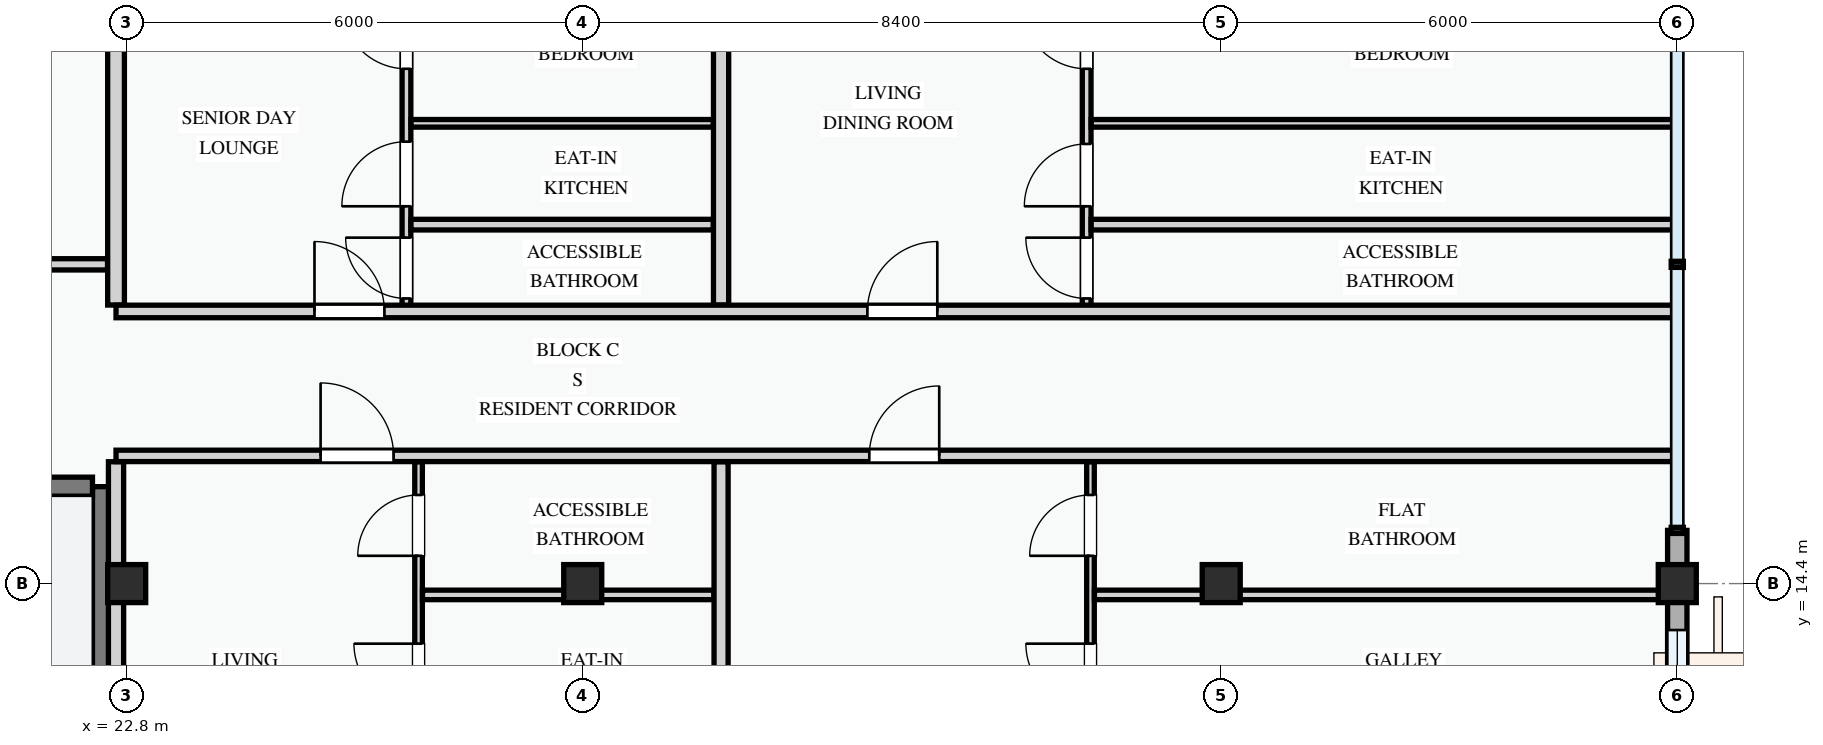
"""IFC4 building model, lengths in metres.
Left out: names, types, materials, properties, quantities, classifications, styles, units other than length and angle.
Written with IfcOpenShell. Run it as: python <this file> out.ifc"""

import sys

from ifc_helpers import new_model, si_unit, direction, frame, frame_2d, origin, origin_2d, place, context, subcontext, project, spatial, rectangle, extrude, element, fill, save


model = new_model("IFC4")
c1 = context("Model", 3, precision=1e-05, world=origin(), true_north=direction((0.0, 1.0)))
c2 = subcontext(c1, "Body", "Model", "MODEL_VIEW")
j1 = project(units=[si_unit("LENGTHUNIT", "METRE"), si_unit("PLANEANGLEUNIT", "RADIAN")], contexts=[c1])
p1 = place(None, origin())
s1 = spatial("IfcSite", under=j1, at=p1, CompositionType="ELEMENT")
p2 = place(p1, origin())
s2 = spatial("IfcBuilding", under=s1, at=p2, CompositionType="ELEMENT")
p3 = place(p2, frame((0.0, 0.0, 31.2)))
s3 = spatial("IfcBuildingStorey", under=s2, at=p3, CompositionType="ELEMENT", Elevation=31.2)
for number, where, z_axis, x_axis in (
    (1, (22.8, 14.4, 0.0), (0.0, 0.0, 1.0), (1.0, 0.0, 0.0)),
    (2, (28.8, 14.4, 0.0), (0.0, 0.0, 1.0), (1.0, 0.0, 0.0)),
    (3, (37.2, 14.4, 0.0), (0.0, 0.0, 1.0), (1.0, 0.0, 0.0)),
    (4, (43.2, 14.4, 0.0), (0.0, 0.0, 1.0), (1.0, 0.0, 0.0)),
):
    element("IfcColumn", number, at=place(p3, frame(where, z_axis=z_axis, x_axis=x_axis)), inside=s3, PredefinedType="COLUMN", context=c2, shape_type="SweptSolid", body=[
        extrude(rectangle(XDim=0.5, YDim=0.5, at=origin_2d()), origin(), (0.0, 0.0, 1.0), 3.3),
    ])
p4 = place(p3, frame((43.2, 8.4, 0.0), z_axis=(0.0, 0.0, 1.0), x_axis=(0.0, 1.0, 0.0)))
e5 = element("IfcWall", 5, at=p4, inside=s3, PredefinedType="STANDARD", context=c2, shape_type="SweptSolid", body=[
    extrude(rectangle(XDim=6.0, YDim=0.255, at=frame_2d((3.0, 0.0))), origin(), (0.0, 0.0, 1.0), 2.575),
])
p5 = place(p4, frame((1.504, 0.0, 0.78)))
e6 = element("IfcOpeningElement", 6, at=p5, cuts=e5, PredefinedType="OPENING", context=c2, shape_type="SweptSolid", body=[
    extrude(rectangle(XDim=0.9, YDim=1.2, at=frame_2d((0.45, 0.6))), frame((0.0, 0.137, 0.0), z_axis=(0.0, -1.0, 0.0), x_axis=(1.0, 0.0, 0.0)), (0.0, 0.0, 1.0), 0.275),
])
p6 = place(p4, frame((4.139, 0.0, 0.78)))
e7 = element("IfcOpeningElement", 7, at=p6, cuts=e5, PredefinedType="OPENING", context=c2, shape_type="SweptSolid", body=[
    extrude(rectangle(XDim=1.25, YDim=1.3, at=frame_2d((0.625, 0.65))), frame((0.0, 0.137, 0.0), z_axis=(0.0, -1.0, 0.0), x_axis=(1.0, 0.0, 0.0)), (0.0, 0.0, 1.0), 0.275),
])
p7 = place(p3, frame((43.2, 14.4, 0.0), z_axis=(0.0, 0.0, 1.0), x_axis=(0.0, 1.0, 0.0)))
e8 = element("IfcWall", 8, at=p7, inside=s3, PredefinedType="STANDARD", context=c2, shape_type="SweptSolid", body=[
    extrude(rectangle(XDim=0.7, YDim=0.255, at=frame_2d((0.35, 0.0))), origin(), (0.0, 0.0, 1.0), 2.425),
])
p8 = place(p3, frame((22.475, 8.75, 0.0), z_axis=(0.0, 0.0, 1.0), x_axis=(0.0, 1.0, 0.0)))
e9 = element("IfcWall", 9, at=p8, inside=s3, PredefinedType="SHEAR", context=c2, shape_type="SweptSolid", body=[
    extrude(rectangle(XDim=6.925, YDim=0.25, at=frame_2d((3.462, 0.0))), origin(), (0.0, 0.0, 1.0), 3.0),
])
p9 = place(p3, frame((8.85, 15.675, 0.0), z_axis=(0.0, 0.0, 1.0), x_axis=(1.0, 0.0, 0.0)))
e10 = element("IfcWall", 10, at=p9, inside=s3, PredefinedType="SHEAR", context=c2, shape_type="SweptSolid", body=[
    extrude(rectangle(XDim=13.5, YDim=0.25, at=frame_2d((6.75, 0.0))), origin(), (0.0, 0.0, 1.0), 3.0),
])
p10 = place(p9, frame((6.2, 0.0, 0.0)))
e11 = element("IfcOpeningElement", 11, at=p10, cuts=e10, PredefinedType="OPENING", context=c2, shape_type="SweptSolid", body=[
    extrude(rectangle(XDim=1.1, YDim=2.15, at=frame_2d((0.55, 1.075))), frame((0.0, 0.135, 0.0), z_axis=(0.0, -1.0, 0.0), x_axis=(1.0, 0.0, 0.0)), (0.0, 0.0, 1.0), 0.27),
])
p11 = place(p3, frame((18.025, 18.6, 0.0), z_axis=(0.0, 0.0, 1.0), x_axis=(1.0, 0.0, 0.0)))
e12 = element("IfcWall", 12, at=p11, inside=s3, PredefinedType="PARTITIONING", context=c2, shape_type="SweptSolid", body=[
    extrude(rectangle(XDim=4.523, YDim=0.148, at=frame_2d((2.262, 0.0))), origin(), (0.0, 0.0, 1.0), 3.0),
])
p12 = place(p11, frame((1.65, 0.0, 0.0)))
e13 = element("IfcOpeningElement", 13, at=p12, cuts=e12, PredefinedType="OPENING", context=c2, shape_type="SweptSolid", body=[
    extrude(rectangle(XDim=1.0, YDim=2.15, at=frame_2d((0.5, 1.075))), frame((0.0, 0.084, 0.0), z_axis=(0.0, -1.0, 0.0), x_axis=(1.0, 0.0, 0.0)), (0.0, 0.0, 1.0), 0.168),
])
p13 = place(p3, frame((26.64, 8.53, 0.0), z_axis=(0.0, 0.0, 1.0), x_axis=(0.0, 1.0, 0.0)))
e14 = element("IfcWall", 14, at=p13, inside=s3, PredefinedType="PARTITIONING", context=c2, shape_type="SweptSolid", body=[
    extrude(rectangle(XDim=7.473, YDim=0.1, at=frame_2d((3.737, 0.0))), origin(), (0.0, 0.0, 1.0), 3.0),
])
p14 = place(p13, frame((1.334, 0.0, 0.0)))
e15 = element("IfcOpeningElement", 15, at=p14, cuts=e14, PredefinedType="OPENING", context=c2, shape_type="SweptSolid", body=[
    extrude(rectangle(XDim=0.85, YDim=2.1, at=frame_2d((0.425, 1.05))), frame((0.0, 0.06, 0.0), z_axis=(0.0, -1.0, 0.0), x_axis=(1.0, 0.0, 0.0)), (0.0, 0.0, 1.0), 0.12),
])
p15 = place(p13, frame((4.23, 0.0, 0.0)))
e16 = element("IfcOpeningElement", 16, at=p15, cuts=e14, PredefinedType="OPENING", context=c2, shape_type="SweptSolid", body=[
    extrude(rectangle(XDim=0.85, YDim=2.1, at=frame_2d((0.425, 1.05))), frame((0.0, 0.06, 0.0), z_axis=(0.0, -1.0, 0.0), x_axis=(1.0, 0.0, 0.0)), (0.0, 0.0, 1.0), 0.12),
])
p16 = place(p13, frame((6.236, 0.0, 0.0)))
e17 = element("IfcOpeningElement", 17, at=p16, cuts=e14, PredefinedType="OPENING", context=c2, shape_type="SweptSolid", body=[
    extrude(rectangle(XDim=0.8, YDim=2.1, at=frame_2d((0.4, 1.05))), frame((0.0, 0.06, 0.0), z_axis=(0.0, -1.0, 0.0), x_axis=(1.0, 0.0, 0.0)), (0.0, 0.0, 1.0), 0.12),
])
p17 = place(p3, frame((26.692, 14.251, 0.0), z_axis=(0.0, 0.0, 1.0), x_axis=(1.0, 0.0, 0.0)))
e18 = element("IfcWall", 18, at=p17, inside=s3, PredefinedType="PARTITIONING", context=c2, shape_type="SweptSolid", body=[
    extrude(rectangle(XDim=3.833, YDim=0.125, at=frame_2d((1.917, 0.0))), origin(), (0.0, 0.0, 1.0), 2.375),
])
p18 = place(p3, frame((26.481, 17.98, 0.0), z_axis=(0.0, 0.0, 1.0), x_axis=(0.0, 1.0, 0.0)))
e19 = element("IfcWall", 19, at=p18, inside=s3, PredefinedType="PARTITIONING", context=c2, shape_type="SweptSolid", body=[
    extrude(rectangle(XDim=4.69, YDim=0.115, at=frame_2d((2.345, 0.0))), origin(), (0.0, 0.0, 1.0), 3.0),
])
p19 = place(p18, frame((0.171, 0.0, 0.0)))
e20 = element("IfcOpeningElement", 20, at=p19, cuts=e19, PredefinedType="OPENING", context=c2, shape_type="SweptSolid", body=[
    extrude(rectangle(XDim=0.8, YDim=2.1, at=frame_2d((0.4, 1.05))), frame((0.0, 0.067, 0.0), z_axis=(0.0, -1.0, 0.0), x_axis=(1.0, 0.0, 0.0)), (0.0, 0.0, 1.0), 0.135),
])
p20 = place(p18, frame((1.384, 0.0, 0.0)))
e21 = element("IfcOpeningElement", 21, at=p20, cuts=e19, PredefinedType="OPENING", context=c2, shape_type="SweptSolid", body=[
    extrude(rectangle(XDim=0.85, YDim=2.1, at=frame_2d((0.425, 1.05))), frame((0.0, 0.067, 0.0), z_axis=(0.0, -1.0, 0.0), x_axis=(1.0, 0.0, 0.0)), (0.0, 0.0, 1.0), 0.135),
])
p21 = place(p18, frame((3.193, 0.0, 0.0)))
e22 = element("IfcOpeningElement", 22, at=p21, cuts=e19, PredefinedType="OPENING", context=c2, shape_type="SweptSolid", body=[
    extrude(rectangle(XDim=0.85, YDim=2.1, at=frame_2d((0.425, 1.05))), frame((0.0, 0.067, 0.0), z_axis=(0.0, -1.0, 0.0), x_axis=(1.0, 0.0, 0.0)), (0.0, 0.0, 1.0), 0.135),
])
p22 = place(p3, frame((26.54, 20.455, 0.0), z_axis=(0.0, 0.0, 1.0), x_axis=(1.0, 0.0, 0.0)))
e23 = element("IfcWall", 23, at=p22, inside=s3, PredefinedType="PARTITIONING", context=c2, shape_type="SweptSolid", body=[
    extrude(rectangle(XDim=3.978, YDim=0.1, at=frame_2d((1.989, 0.0))), origin(), (0.0, 0.0, 1.0), 3.0),
])
p23 = place(p3, frame((26.54, 19.122, 0.0), z_axis=(0.0, 0.0, 1.0), x_axis=(1.0, 0.0, 0.0)))
e24 = element("IfcWall", 24, at=p23, inside=s3, PredefinedType="PARTITIONING", context=c2, shape_type="SweptSolid", body=[
    extrude(rectangle(XDim=3.978, YDim=0.14, at=frame_2d((1.989, 0.0))), origin(), (0.0, 0.0, 1.0), 3.0),
])
p24 = place(p3, frame((22.66, 8.53, 0.0), z_axis=(0.0, 0.0, 1.0), x_axis=(0.0, 1.0, 0.0)))
e25 = element("IfcWall", 25, at=p24, inside=s3, PredefinedType="PARTITIONING", context=c2, shape_type="SweptSolid", body=[
    extrude(rectangle(XDim=7.473, YDim=0.2, at=frame_2d((3.737, 0.0))), origin(), (0.0, 0.0, 1.0), 2.425),
])
p25 = place(p3, frame((22.66, 18.064, 0.0), z_axis=(0.0, 0.0, 1.0), x_axis=(0.0, 1.0, 0.0)))
e26 = element("IfcWall", 26, at=p25, inside=s3, PredefinedType="PARTITIONING", context=c2, shape_type="SweptSolid", body=[
    extrude(rectangle(XDim=4.676, YDim=0.22, at=frame_2d((2.338, 0.0))), origin(), (0.0, 0.0, 1.0), 2.425),
])
p26 = place(p3, frame((35.48, 8.53, 0.0), z_axis=(0.0, 0.0, 1.0), x_axis=(0.0, 1.0, 0.0)))
e27 = element("IfcWall", 27, at=p26, inside=s3, PredefinedType="PARTITIONING", context=c2, shape_type="SweptSolid", body=[
    extrude(rectangle(XDim=7.473, YDim=0.1, at=frame_2d((3.737, 0.0))), origin(), (0.0, 0.0, 1.0), 3.0),
])
p27 = place(p26, frame((1.334, 0.0, 0.0)))
e28 = element("IfcOpeningElement", 28, at=p27, cuts=e27, PredefinedType="OPENING", context=c2, shape_type="SweptSolid", body=[
    extrude(rectangle(XDim=0.82, YDim=2.08, at=frame_2d((0.41, 1.04))), frame((0.0, 0.06, 0.0), z_axis=(0.0, -1.0, 0.0), x_axis=(1.0, 0.0, 0.0)), (0.0, 0.0, 1.0), 0.12),
])
p28 = place(p26, frame((4.23, 0.0, 0.0)))
e29 = element("IfcOpeningElement", 29, at=p28, cuts=e27, PredefinedType="OPENING", context=c2, shape_type="SweptSolid", body=[
    extrude(rectangle(XDim=0.85, YDim=2.1, at=frame_2d((0.425, 1.05))), frame((0.0, 0.06, 0.0), z_axis=(0.0, -1.0, 0.0), x_axis=(1.0, 0.0, 0.0)), (0.0, 0.0, 1.0), 0.12),
])
p29 = place(p26, frame((6.236, 0.0, 0.0)))
e30 = element("IfcOpeningElement", 30, at=p29, cuts=e27, PredefinedType="OPENING", context=c2, shape_type="SweptSolid", body=[
    extrude(rectangle(XDim=0.8, YDim=2.1, at=frame_2d((0.4, 1.05))), frame((0.0, 0.06, 0.0), z_axis=(0.0, -1.0, 0.0), x_axis=(1.0, 0.0, 0.0)), (0.0, 0.0, 1.0), 0.12),
])
p30 = place(p3, frame((35.532, 14.251, 0.0), z_axis=(0.0, 0.0, 1.0), x_axis=(1.0, 0.0, 0.0)))
e31 = element("IfcWall", 31, at=p30, inside=s3, PredefinedType="PARTITIONING", context=c2, shape_type="SweptSolid", body=[
    extrude(rectangle(XDim=7.539, YDim=0.125, at=frame_2d((3.769, 0.0))), origin(), (0.0, 0.0, 1.0), 2.375),
])
p31 = place(p3, frame((35.43, 17.98, 0.0), z_axis=(0.0, 0.0, 1.0), x_axis=(0.0, 1.0, 0.0)))
e32 = element("IfcWall", 32, at=p31, inside=s3, PredefinedType="PARTITIONING", context=c2, shape_type="SweptSolid", body=[
    extrude(rectangle(XDim=4.76, YDim=0.115, at=frame_2d((2.38, 0.0))), origin(), (0.0, 0.0, 1.0), 3.0),
])
p32 = place(p31, frame((0.171, 0.0, 0.0)))
e33 = element("IfcOpeningElement", 33, at=p32, cuts=e32, PredefinedType="OPENING", context=c2, shape_type="SweptSolid", body=[
    extrude(rectangle(XDim=0.8, YDim=2.1, at=frame_2d((0.4, 1.05))), frame((0.0, 0.067, 0.0), z_axis=(0.0, -1.0, 0.0), x_axis=(1.0, 0.0, 0.0)), (0.0, 0.0, 1.0), 0.135),
])
p33 = place(p31, frame((1.384, 0.0, 0.0)))
e34 = element("IfcOpeningElement", 34, at=p33, cuts=e32, PredefinedType="OPENING", context=c2, shape_type="SweptSolid", body=[
    extrude(rectangle(XDim=0.82, YDim=2.08, at=frame_2d((0.41, 1.04))), frame((0.0, 0.067, 0.0), z_axis=(0.0, -1.0, 0.0), x_axis=(1.0, 0.0, 0.0)), (0.0, 0.0, 1.0), 0.135),
])
p34 = place(p31, frame((3.193, 0.0, 0.0)))
e35 = element("IfcOpeningElement", 35, at=p34, cuts=e32, PredefinedType="OPENING", context=c2, shape_type="SweptSolid", body=[
    extrude(rectangle(XDim=0.85, YDim=2.1, at=frame_2d((0.425, 1.05))), frame((0.0, 0.067, 0.0), z_axis=(0.0, -1.0, 0.0), x_axis=(1.0, 0.0, 0.0)), (0.0, 0.0, 1.0), 0.135),
])
p35 = place(p3, frame((35.489, 20.455, 0.0), z_axis=(0.0, 0.0, 1.0), x_axis=(1.0, 0.0, 0.0)))
e36 = element("IfcWall", 36, at=p35, inside=s3, PredefinedType="PARTITIONING", context=c2, shape_type="SweptSolid", body=[
    extrude(rectangle(XDim=7.651, YDim=0.1, at=frame_2d((3.825, 0.0))), origin(), (0.0, 0.0, 1.0), 3.0),
])
p36 = place(p3, frame((35.489, 19.122, 0.0), z_axis=(0.0, 0.0, 1.0), x_axis=(1.0, 0.0, 0.0)))
e37 = element("IfcWall", 37, at=p36, inside=s3, PredefinedType="PARTITIONING", context=c2, shape_type="SweptSolid", body=[
    extrude(rectangle(XDim=7.651, YDim=0.14, at=frame_2d((3.825, 0.0))), origin(), (0.0, 0.0, 1.0), 3.0),
])
p37 = place(p3, frame((30.62, 8.53, 0.0), z_axis=(0.0, 0.0, 1.0), x_axis=(0.0, 1.0, 0.0)))
e38 = element("IfcWall", 38, at=p37, inside=s3, PredefinedType="PARTITIONING", context=c2, shape_type="SweptSolid", body=[
    extrude(rectangle(XDim=7.473, YDim=0.185, at=frame_2d((3.737, 0.0))), origin(), (0.0, 0.0, 1.0), 3.0),
])
p38 = place(p3, frame((30.62, 18.064, 0.0), z_axis=(0.0, 0.0, 1.0), x_axis=(0.0, 1.0, 0.0)))
e39 = element("IfcWall", 39, at=p38, inside=s3, PredefinedType="PARTITIONING", context=c2, shape_type="SweptSolid", body=[
    extrude(rectangle(XDim=4.676, YDim=0.2, at=frame_2d((2.338, 0.0))), origin(), (0.0, 0.0, 1.0), 3.0),
])
p39 = place(p3, frame((22.66, 16.08, 0.0), z_axis=(0.0, 0.0, 1.0), x_axis=(1.0, 0.0, 0.0)))
e40 = element("IfcWall", 40, at=p39, inside=s3, PredefinedType="PARTITIONING", context=c2, shape_type="SweptSolid", body=[
    extrude(rectangle(XDim=20.48, YDim=0.15, at=frame_2d((10.24, 0.0))), origin(), (0.0, 0.0, 1.0), 3.0),
])
p40 = place(p39, frame((2.691, 0.0, 0.0)))
e41 = element("IfcOpeningElement", 41, at=p40, cuts=e40, PredefinedType="OPENING", context=c2, shape_type="SweptSolid", body=[
    extrude(rectangle(XDim=0.96, YDim=2.12, at=frame_2d((0.48, 1.06))), frame((0.0, 0.085, 0.0), z_axis=(0.0, -1.0, 0.0), x_axis=(1.0, 0.0, 0.0)), (0.0, 0.0, 1.0), 0.17),
])
p41 = place(p39, frame((9.91, 0.0, 0.0)))
e42 = element("IfcOpeningElement", 42, at=p41, cuts=e40, PredefinedType="OPENING", context=c2, shape_type="SweptSolid", body=[
    extrude(rectangle(XDim=0.92, YDim=2.1, at=frame_2d((0.46, 1.05))), frame((0.0, 0.085, 0.0), z_axis=(0.0, -1.0, 0.0), x_axis=(1.0, 0.0, 0.0)), (0.0, 0.0, 1.0), 0.17),
])
p42 = place(p3, frame((22.66, 17.98, 0.0), z_axis=(0.0, 0.0, 1.0), x_axis=(1.0, 0.0, 0.0)))
e43 = element("IfcWall", 43, at=p42, inside=s3, PredefinedType="PARTITIONING", context=c2, shape_type="SweptSolid", body=[
    extrude(rectangle(XDim=20.48, YDim=0.165, at=frame_2d((10.24, 0.0))), origin(), (0.0, 0.0, 1.0), 3.0),
])
p43 = place(p42, frame((2.611, 0.0, 0.0)))
e44 = element("IfcOpeningElement", 44, at=p43, cuts=e43, PredefinedType="OPENING", context=c2, shape_type="SweptSolid", body=[
    extrude(rectangle(XDim=0.92, YDim=2.1, at=frame_2d((0.46, 1.05))), frame((0.0, 0.093, 0.0), z_axis=(0.0, -1.0, 0.0), x_axis=(1.0, 0.0, 0.0)), (0.0, 0.0, 1.0), 0.185),
])
p44 = place(p42, frame((9.885, 0.0, 0.0)))
e45 = element("IfcOpeningElement", 45, at=p44, cuts=e43, PredefinedType="OPENING", context=c2, shape_type="SweptSolid", body=[
    extrude(rectangle(XDim=0.92, YDim=2.1, at=frame_2d((0.46, 1.05))), frame((0.0, 0.093, 0.0), z_axis=(0.0, -1.0, 0.0), x_axis=(1.0, 0.0, 0.0)), (0.0, 0.0, 1.0), 0.185),
])
p45 = place(p6, origin())
e46 = element("IfcWindow", 46, at=p45, inside=s3, PartitioningType="SINGLE_PANEL", PredefinedType="WINDOW", context=c2, shape_type="SweptSolid", body=[
    extrude(rectangle(XDim=1.25, YDim=1.3, at=frame_2d((0.625, 0.65))), frame((0.0, 0.03, 0.0), z_axis=(0.0, -1.0, 0.0), x_axis=(1.0, 0.0, 0.0)), (0.0, 0.0, 1.0), 0.06),
])
fill(e7, e46)
p46 = place(p15, origin())
e47 = element("IfcDoor", 47, at=p46, inside=s3, OperationType="SINGLE_SWING_RIGHT", PredefinedType="DOOR", context=c2, shape_type="SweptSolid", body=[
    extrude(rectangle(XDim=0.85, YDim=2.1, at=frame_2d((0.425, 1.05))), frame((0.0, 0.025, 0.0), z_axis=(0.0, -1.0, 0.0), x_axis=(1.0, 0.0, 0.0)), (0.0, 0.0, 1.0), 0.05),
])
fill(e16, e47)
p47 = place(p16, origin())
e48 = element("IfcDoor", 48, at=p47, inside=s3, OperationType="SINGLE_SWING_LEFT", PredefinedType="DOOR", context=c2, shape_type="SweptSolid", body=[
    extrude(rectangle(XDim=0.8, YDim=2.1, at=frame_2d((0.4, 1.05))), frame((0.0, 0.025, 0.0), z_axis=(0.0, -1.0, 0.0), x_axis=(1.0, 0.0, 0.0)), (0.0, 0.0, 1.0), 0.05),
])
fill(e17, e48)
p48 = place(p19, origin())
e49 = element("IfcDoor", 49, at=p48, inside=s3, OperationType="SINGLE_SWING_RIGHT", PredefinedType="DOOR", context=c2, shape_type="SweptSolid", body=[
    extrude(rectangle(XDim=0.8, YDim=2.1, at=frame_2d((0.4, 1.05))), frame((0.0, 0.025, 0.0), z_axis=(0.0, -1.0, 0.0), x_axis=(1.0, 0.0, 0.0)), (0.0, 0.0, 1.0), 0.05),
])
fill(e20, e49)
p49 = place(p20, origin())
e50 = element("IfcDoor", 50, at=p49, inside=s3, OperationType="SINGLE_SWING_LEFT", PredefinedType="DOOR", context=c2, shape_type="SweptSolid", body=[
    extrude(rectangle(XDim=0.85, YDim=2.1, at=frame_2d((0.425, 1.05))), frame((0.0, 0.025, 0.0), z_axis=(0.0, -1.0, 0.0), x_axis=(1.0, 0.0, 0.0)), (0.0, 0.0, 1.0), 0.05),
])
fill(e21, e50)
p50 = place(p21, origin())
e51 = element("IfcDoor", 51, at=p50, inside=s3, OperationType="SINGLE_SWING_RIGHT", PredefinedType="DOOR", context=c2, shape_type="SweptSolid", body=[
    extrude(rectangle(XDim=0.85, YDim=2.1, at=frame_2d((0.425, 1.05))), frame((0.0, 0.025, 0.0), z_axis=(0.0, -1.0, 0.0), x_axis=(1.0, 0.0, 0.0)), (0.0, 0.0, 1.0), 0.05),
])
fill(e22, e51)
p51 = place(p28, origin())
e52 = element("IfcDoor", 52, at=p51, inside=s3, OperationType="SINGLE_SWING_RIGHT", PredefinedType="DOOR", context=c2, shape_type="SweptSolid", body=[
    extrude(rectangle(XDim=0.85, YDim=2.1, at=frame_2d((0.425, 1.05))), frame((0.0, 0.025, 0.0), z_axis=(0.0, -1.0, 0.0), x_axis=(1.0, 0.0, 0.0)), (0.0, 0.0, 1.0), 0.05),
])
fill(e29, e52)
p52 = place(p29, origin())
e53 = element("IfcDoor", 53, at=p52, inside=s3, OperationType="SINGLE_SWING_LEFT", PredefinedType="DOOR", context=c2, shape_type="SweptSolid", body=[
    extrude(rectangle(XDim=0.8, YDim=2.1, at=frame_2d((0.4, 1.05))), frame((0.0, 0.025, 0.0), z_axis=(0.0, -1.0, 0.0), x_axis=(1.0, 0.0, 0.0)), (0.0, 0.0, 1.0), 0.05),
])
fill(e30, e53)
p53 = place(p32, origin())
e54 = element("IfcDoor", 54, at=p53, inside=s3, OperationType="SINGLE_SWING_RIGHT", PredefinedType="DOOR", context=c2, shape_type="SweptSolid", body=[
    extrude(rectangle(XDim=0.8, YDim=2.1, at=frame_2d((0.4, 1.05))), frame((0.0, 0.025, 0.0), z_axis=(0.0, -1.0, 0.0), x_axis=(1.0, 0.0, 0.0)), (0.0, 0.0, 1.0), 0.05),
])
fill(e33, e54)
p54 = place(p33, origin())
e55 = element("IfcDoor", 55, at=p54, inside=s3, OperationType="SINGLE_SWING_LEFT", PredefinedType="DOOR", context=c2, shape_type="SweptSolid", body=[
    extrude(rectangle(XDim=0.82, YDim=2.08, at=frame_2d((0.41, 1.04))), frame((0.0, 0.025, 0.0), z_axis=(0.0, -1.0, 0.0), x_axis=(1.0, 0.0, 0.0)), (0.0, 0.0, 1.0), 0.05),
])
fill(e34, e55)
p55 = place(p34, origin())
e56 = element("IfcDoor", 56, at=p55, inside=s3, OperationType="SINGLE_SWING_RIGHT", PredefinedType="DOOR", context=c2, shape_type="SweptSolid", body=[
    extrude(rectangle(XDim=0.85, YDim=2.1, at=frame_2d((0.425, 1.05))), frame((0.0, 0.025, 0.0), z_axis=(0.0, -1.0, 0.0), x_axis=(1.0, 0.0, 0.0)), (0.0, 0.0, 1.0), 0.05),
])
fill(e35, e56)
p56 = place(p40, origin())
e57 = element("IfcDoor", 57, at=p56, inside=s3, OperationType="SINGLE_SWING_LEFT", PredefinedType="DOOR", context=c2, shape_type="SweptSolid", body=[
    extrude(rectangle(XDim=0.96, YDim=2.12, at=frame_2d((0.48, 1.06))), frame((0.0, 0.025, 0.0), z_axis=(0.0, -1.0, 0.0), x_axis=(1.0, 0.0, 0.0)), (0.0, 0.0, 1.0), 0.05),
])
fill(e41, e57)
p57 = place(p41, origin())
e58 = element("IfcDoor", 58, at=p57, inside=s3, OperationType="SINGLE_SWING_RIGHT", PredefinedType="DOOR", context=c2, shape_type="SweptSolid", body=[
    extrude(rectangle(XDim=0.92, YDim=2.1, at=frame_2d((0.46, 1.05))), frame((0.0, 0.025, 0.0), z_axis=(0.0, -1.0, 0.0), x_axis=(1.0, 0.0, 0.0)), (0.0, 0.0, 1.0), 0.05),
])
fill(e42, e58)
p58 = place(p43, origin())
e59 = element("IfcDoor", 59, at=p58, inside=s3, OperationType="SINGLE_SWING_LEFT", PredefinedType="DOOR", context=c2, shape_type="SweptSolid", body=[
    extrude(rectangle(XDim=0.92, YDim=2.1, at=frame_2d((0.46, 1.05))), frame((0.0, 0.025, 0.0), z_axis=(0.0, -1.0, 0.0), x_axis=(1.0, 0.0, 0.0)), (0.0, 0.0, 1.0), 0.05),
])
fill(e44, e59)
p59 = place(p44, origin())
e60 = element("IfcDoor", 60, at=p59, inside=s3, OperationType="SINGLE_SWING_RIGHT", PredefinedType="DOOR", context=c2, shape_type="SweptSolid", body=[
    extrude(rectangle(XDim=0.92, YDim=2.1, at=frame_2d((0.46, 1.05))), frame((0.0, 0.025, 0.0), z_axis=(0.0, -1.0, 0.0), x_axis=(1.0, 0.0, 0.0)), (0.0, 0.0, 1.0), 0.05),
])
fill(e45, e60)
save(model, sys.argv[1])
